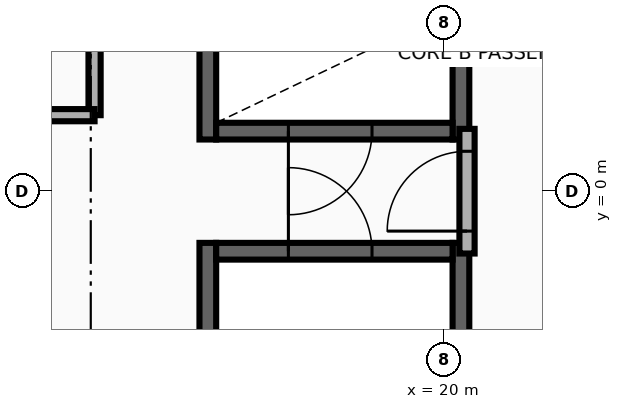
"""IFC4 building model, lengths in metres.
Left out: names, types, materials, properties, quantities, classifications, styles, units other than length and angle.
Written with IfcOpenShell. Run it as: python <this file> out.ifc"""

import sys

from ifc_helpers import new_model, si_unit, direction, frame, frame_2d, origin, place, context, subcontext, project, spatial, rectangle, extrude, element, fill, save


model = new_model("IFC4")
c1 = context("Model", 3, precision=1e-05, world=origin(), true_north=direction((0.0, 1.0)))
c2 = subcontext(c1, "Body", "Model", "MODEL_VIEW")
j1 = project(units=[si_unit("LENGTHUNIT", "METRE"), si_unit("PLANEANGLEUNIT", "RADIAN")], contexts=[c1])
p1 = place(None, origin())
s1 = spatial("IfcSite", under=j1, at=p1, CompositionType="ELEMENT")
p2 = place(p1, origin())
s2 = spatial("IfcBuilding", under=s1, at=p2, CompositionType="ELEMENT")
p3 = place(p2, frame((0.0, 0.0, 85.2)))
s3 = spatial("IfcBuildingStorey", under=s2, at=p3, CompositionType="ELEMENT", Elevation=85.2)
for number, where, z_axis, x_axis in (
    (1, (16.89, 0.68, 0.0), (0.0, 0.0, 1.0), (0.0, 1.0, 0.0)),
    (2, (20.22, 0.68, 0.0), (0.0, 0.0, 1.0), (0.0, 1.0, 0.0)),
):
    element("IfcWall", number, at=place(p3, frame(where, z_axis=z_axis, x_axis=x_axis)), inside=s3, PredefinedType="SHEAR", context=c2, shape_type="SweptSolid", body=[
        extrude(rectangle(XDim=8.52, YDim=0.22, at=frame_2d((4.26, 0.0))), origin(), (0.0, 0.0, 1.0), 3.46),
    ])
p4 = place(p3, frame((17.0, 0.79, 0.0), z_axis=(0.0, 0.0, 1.0), x_axis=(1.0, 0.0, 0.0)))
e3 = element("IfcWall", 3, at=p4, inside=s3, PredefinedType="SHEAR", context=c2, shape_type="SweptSolid", body=[
    extrude(rectangle(XDim=3.11, YDim=0.22, at=frame_2d((1.555, 0.0))), origin(), (0.0, 0.0, 1.0), 3.46),
])
p5 = place(p4, frame((0.95, 0.0, 0.0)))
e4 = element("IfcOpeningElement", 4, at=p5, cuts=e3, PredefinedType="OPENING", context=c2, shape_type="SweptSolid", body=[
    extrude(rectangle(XDim=1.1, YDim=2.15, at=frame_2d((0.55, 1.075))), frame((0.0, 0.125, 0.0), z_axis=(0.0, -1.0, 0.0), x_axis=(1.0, 0.0, 0.0)), (0.0, 0.0, 1.0), 0.25),
])
for number, where, z_axis, x_axis in (
    (5, (16.89, -9.2, 0.0), (0.0, 0.0, 1.0), (0.0, 1.0, 0.0)),
    (6, (20.22, -9.2, 0.0), (0.0, 0.0, 1.0), (0.0, 1.0, 0.0)),
):
    element("IfcWall", number, at=place(p3, frame(where, z_axis=z_axis, x_axis=x_axis)), inside=s3, PredefinedType="SHEAR", context=c2, shape_type="SweptSolid", body=[
        extrude(rectangle(XDim=8.52, YDim=0.22, at=frame_2d((4.26, 0.0))), origin(), (0.0, 0.0, 1.0), 3.46),
    ])
p6 = place(p3, frame((17.0, -0.79, 0.0), z_axis=(0.0, 0.0, 1.0), x_axis=(1.0, 0.0, 0.0)))
e7 = element("IfcWall", 7, at=p6, inside=s3, PredefinedType="SHEAR", context=c2, shape_type="SweptSolid", body=[
    extrude(rectangle(XDim=3.11, YDim=0.22, at=frame_2d((1.555, 0.0))), origin(), (0.0, 0.0, 1.0), 3.46),
])
p7 = place(p6, frame((0.95, 0.0, 0.0)))
e8 = element("IfcOpeningElement", 8, at=p7, cuts=e7, PredefinedType="OPENING", context=c2, shape_type="SweptSolid", body=[
    extrude(rectangle(XDim=1.1, YDim=2.15, at=frame_2d((0.55, 1.075))), frame((0.0, 0.125, 0.0), z_axis=(0.0, -1.0, 0.0), x_axis=(1.0, 0.0, 0.0)), (0.0, 0.0, 1.0), 0.25),
])
p8 = place(p3, frame((20.3, -0.82, 0.0), z_axis=(0.0, 0.0, 1.0), x_axis=(0.0, 1.0, 0.0)))
e9 = element("IfcWall", 9, at=p8, inside=s3, PredefinedType="PARTITIONING", context=c2, shape_type="SweptSolid", body=[
    extrude(rectangle(XDim=1.64, YDim=0.2, at=frame_2d((0.82, 0.0))), origin(), (0.0, 0.0, 1.0), 3.46),
])
p9 = place(p8, frame((0.295, 0.0, 0.0)))
e10 = element("IfcOpeningElement", 10, at=p9, cuts=e9, PredefinedType="OPENING", context=c2, shape_type="SweptSolid", body=[
    extrude(rectangle(XDim=1.05, YDim=2.15, at=frame_2d((0.525, 1.075))), frame((0.0, 0.115, 0.0), z_axis=(0.0, -1.0, 0.0), x_axis=(1.0, 0.0, 0.0)), (0.0, 0.0, 1.0), 0.23),
])
p10 = place(p3, frame((15.4, 1.0, 0.0), z_axis=(0.0, 0.0, 1.0), x_axis=(0.0, 1.0, 0.0)))
e11 = element("IfcWall", 11, at=p10, inside=s3, PredefinedType="PARTITIONING", context=c2, shape_type="SweptSolid", body=[
    extrude(rectangle(XDim=9.35, YDim=0.16, at=frame_2d((4.675, 0.0))), origin(), (0.0, 0.0, 1.0), 2.245),
])
p11 = place(p3, frame((13.41, 1.0, 0.0), z_axis=(0.0, 0.0, 1.0), x_axis=(1.0, 0.0, 0.0)))
e12 = element("IfcWall", 12, at=p11, inside=s3, PredefinedType="PARTITIONING", context=c2, shape_type="SweptSolid", body=[
    extrude(rectangle(XDim=1.99, YDim=0.16, at=frame_2d((0.995, 0.0))), origin(), (0.0, 0.0, 1.0), 2.245),
])
p12 = place(p9, origin())
e13 = element("IfcDoor", 13, at=p12, inside=s3, OperationType="SINGLE_SWING_RIGHT", PredefinedType="DOOR", context=c2, shape_type="SweptSolid", body=[
    extrude(rectangle(XDim=1.05, YDim=2.15, at=frame_2d((0.525, 1.075))), frame((0.0, 0.025, 0.0), z_axis=(0.0, -1.0, 0.0), x_axis=(1.0, 0.0, 0.0)), (0.0, 0.0, 1.0), 0.05),
])
fill(e10, e13)
p13 = place(p5, frame((1.1, 0.0, 0.0), z_axis=(0.0, 0.0, 1.0), x_axis=(-1.0, 0.0, 0.0)))
e14 = element("IfcDoor", 14, at=p13, inside=s3, OperationType="SINGLE_SWING_LEFT", PredefinedType="DOOR", context=c2, shape_type="SweptSolid", body=[
    extrude(rectangle(XDim=1.1, YDim=2.15, at=frame_2d((0.55, 1.075))), frame((0.0, 0.025, 0.0), z_axis=(0.0, -1.0, 0.0), x_axis=(1.0, 0.0, 0.0)), (0.0, 0.0, 1.0), 0.05),
])
fill(e4, e14)
p14 = place(p7, origin())
e15 = element("IfcDoor", 15, at=p14, inside=s3, OperationType="SINGLE_SWING_RIGHT", PredefinedType="DOOR", context=c2, shape_type="SweptSolid", body=[
    extrude(rectangle(XDim=1.1, YDim=2.15, at=frame_2d((0.55, 1.075))), frame((0.0, 0.025, 0.0), z_axis=(0.0, -1.0, 0.0), x_axis=(1.0, 0.0, 0.0)), (0.0, 0.0, 1.0), 0.05),
])
fill(e8, e15)
save(model, sys.argv[1])
